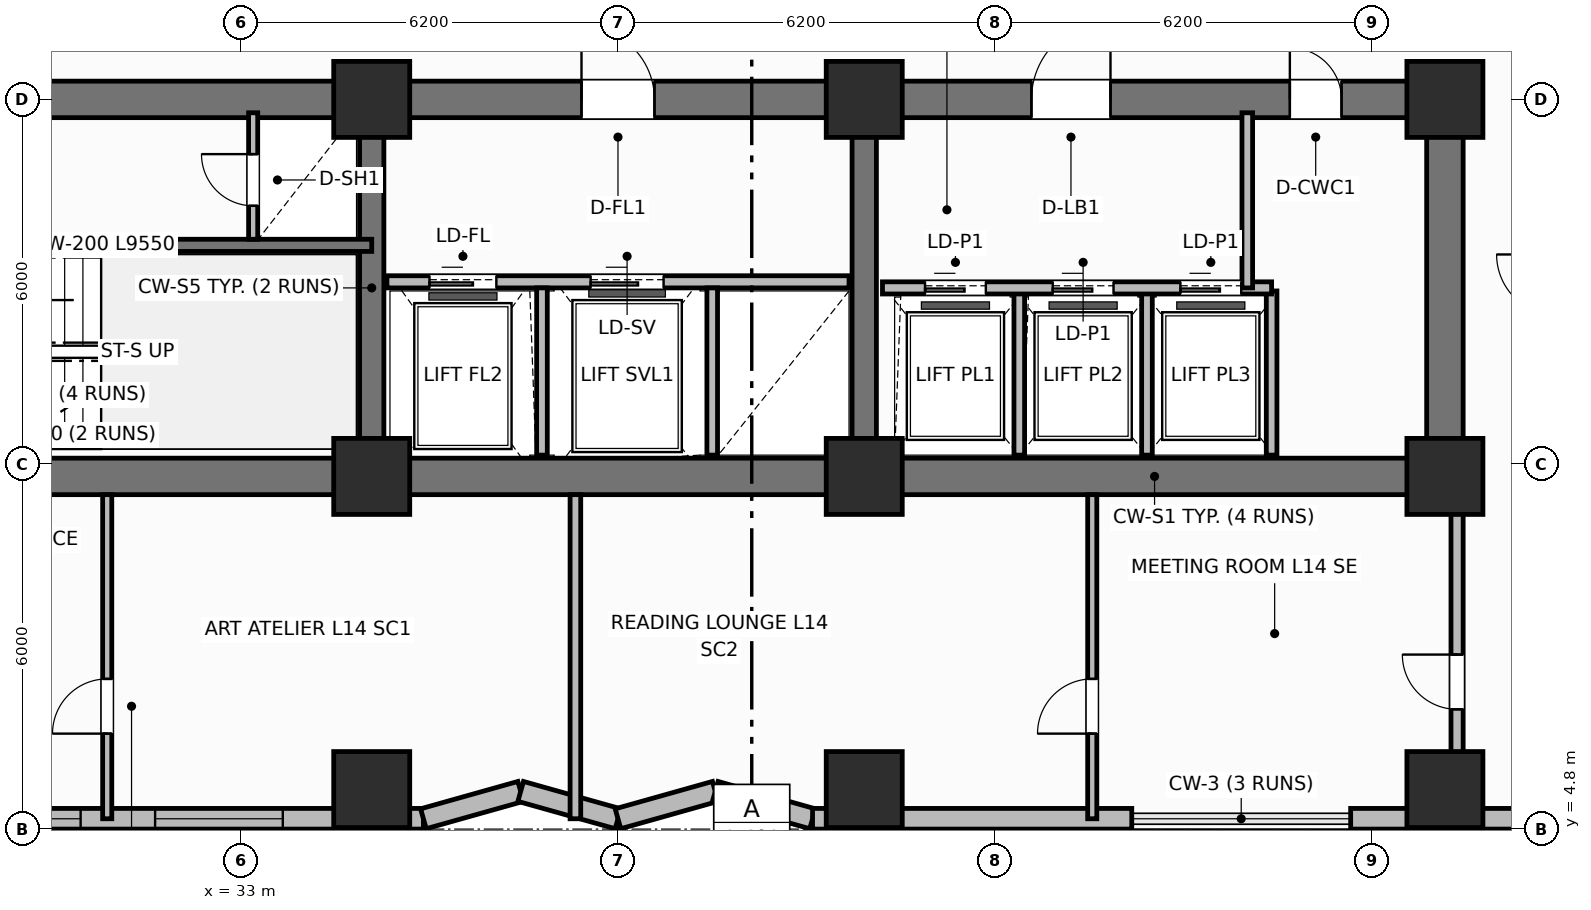
"""IFC4 building model, lengths in metres.
Left out: names, types, materials, properties, quantities, classifications, styles, units other than length and angle.
Written with IfcOpenShell. Run it as: python <this file> out.ifc"""

import sys

from ifc_helpers import new_model, si_unit, direction, frame, frame_2d, origin, origin_2d, place, context, subcontext, project, spatial, rectangle, extrude, element, fill, save


model = new_model("IFC4")
c1 = context("Model", 3, precision=1e-05, world=origin(), true_north=direction((0.0, 1.0)))
c2 = subcontext(c1, "Body", "Model", "MODEL_VIEW")
j1 = project(units=[si_unit("LENGTHUNIT", "METRE"), si_unit("PLANEANGLEUNIT", "RADIAN")], contexts=[c1])
p1 = place(None, origin())
s1 = spatial("IfcSite", under=j1, at=p1, CompositionType="ELEMENT")
p2 = place(p1, origin())
s2 = spatial("IfcBuilding", under=s1, at=p2, CompositionType="ELEMENT")
p3 = place(p2, frame((0.0, 0.0, 58.4)))
s3 = spatial("IfcBuildingStorey", under=s2, at=p3, CompositionType="ELEMENT", Elevation=58.4)
p4 = place(p3, frame((52.8, 10.6, 0.0), z_axis=(0.0, 0.0, 1.0), x_axis=(-1.0, 0.0, 0.0)))
e1 = element("IfcWall", 1, at=p4, inside=s3, PredefinedType="SHEAR", context=c2, shape_type="SweptSolid", body=[
    extrude(rectangle(XDim=27.2, YDim=0.6, at=frame_2d((13.6, 0.0))), origin(), (0.0, 0.0, 1.0), 3.7),
])
p5 = place(p3, frame((52.8, 10.9, 0.0), z_axis=(0.0, 0.0, 1.0), x_axis=(0.0, 1.0, 0.0)))
e2 = element("IfcWall", 2, at=p5, inside=s3, PredefinedType="SHEAR", context=c2, shape_type="SweptSolid", body=[
    extrude(rectangle(XDim=5.6, YDim=0.6, at=frame_2d((2.8, 0.0))), origin(), (0.0, 0.0, 1.0), 3.7),
])
p6 = place(p3, frame((25.6, 16.8, 0.0), z_axis=(0.0, 0.0, 1.0), x_axis=(1.0, 0.0, 0.0)))
e3 = element("IfcWall", 3, at=p6, inside=s3, PredefinedType="SHEAR", context=c2, shape_type="SweptSolid", body=[
    extrude(rectangle(XDim=27.2, YDim=0.6, at=frame_2d((13.6, 0.0))), origin(), (0.0, 0.0, 1.0), 3.7),
])
p7 = place(p6, frame((1.9, 0.0, 0.0)))
e4 = element("IfcOpeningElement", 4, at=p7, cuts=e3, PredefinedType="OPENING", context=c2, shape_type="SweptSolid", body=[
    extrude(rectangle(XDim=1.1, YDim=2.15, at=frame_2d((0.55, 1.075))), frame((0.0, 0.31, 0.0), z_axis=(0.0, -1.0, 0.0), x_axis=(1.0, 0.0, 0.0)), (0.0, 0.0, 1.0), 0.62),
])
p8 = place(p6, frame((13.0, 0.0, 0.0)))
e5 = element("IfcOpeningElement", 5, at=p8, cuts=e3, PredefinedType="OPENING", context=c2, shape_type="SweptSolid", body=[
    extrude(rectangle(XDim=1.2, YDim=2.15, at=frame_2d((0.6, 1.075))), frame((0.0, 0.31, 0.0), z_axis=(0.0, -1.0, 0.0), x_axis=(1.0, 0.0, 0.0)), (0.0, 0.0, 1.0), 0.62),
])
p9 = place(p6, frame((20.4, 0.0, 0.0)))
e6 = element("IfcOpeningElement", 6, at=p9, cuts=e3, PredefinedType="OPENING", context=c2, shape_type="SweptSolid", body=[
    extrude(rectangle(XDim=1.3, YDim=2.2, at=frame_2d((0.65, 1.1))), frame((0.0, 0.31, 0.0), z_axis=(0.0, -1.0, 0.0), x_axis=(1.0, 0.0, 0.0)), (0.0, 0.0, 1.0), 0.62),
])
p10 = place(p6, frame((24.65, 0.0, 0.0)))
e7 = element("IfcOpeningElement", 7, at=p10, cuts=e3, PredefinedType="OPENING", context=c2, shape_type="SweptSolid", body=[
    extrude(rectangle(XDim=0.85, YDim=2.1, at=frame_2d((0.425, 1.05))), frame((0.0, 0.31, 0.0), z_axis=(0.0, -1.0, 0.0), x_axis=(1.0, 0.0, 0.0)), (0.0, 0.0, 1.0), 0.62),
])
for number, where, z_axis, x_axis in (
    (8, (35.15, 10.9, 0.0), (0.0, 0.0, 1.0), (0.0, 1.0, 0.0)),
    (9, (43.25, 10.9, 0.0), (0.0, 0.0, 1.0), (0.0, 1.0, 0.0)),
):
    element("IfcWall", number, at=place(p3, frame(where, z_axis=z_axis, x_axis=x_axis)), inside=s3, PredefinedType="SHEAR", context=c2, shape_type="SweptSolid", body=[
        extrude(rectangle(XDim=5.6, YDim=0.4, at=frame_2d((2.8, 0.0))), origin(), (0.0, 0.0, 1.0), 3.7),
    ])
for number, where, z_axis, x_axis in (
    (10, (35.15, 10.6, 0.0), (0.0, 0.0, 1.0), (1.0, 0.0, 0.0)),
    (11, (35.15, 16.8, 0.0), (0.0, 0.0, 1.0), (1.0, 0.0, 0.0)),
    (12, (43.25, 10.6, 0.0), (0.0, 0.0, 1.0), (1.0, 0.0, 0.0)),
    (13, (43.25, 16.8, 0.0), (0.0, 0.0, 1.0), (1.0, 0.0, 0.0)),
    (14, (52.8, 10.6, 0.0), (0.0, 0.0, 1.0), (1.0, 0.0, 0.0)),
    (15, (52.8, 16.8, 0.0), (0.0, 0.0, 1.0), (1.0, 0.0, 0.0)),
    (16, (35.15, 5.45, 0.0), (0.0, 0.0, 1.0), (1.0, 0.0, 0.0)),
    (17, (43.25, 5.45, 0.0), (0.0, 0.0, 1.0), (1.0, 0.0, 0.0)),
    (18, (52.8, 5.45, 0.0), (0.0, 0.0, 1.0), (1.0, 0.0, 0.0)),
):
    element("IfcColumn", number, at=place(p3, frame(where, z_axis=z_axis, x_axis=x_axis)), inside=s3, PredefinedType="COLUMN", context=c2, shape_type="SweptSolid", body=[
        extrude(rectangle(XDim=1.25, YDim=1.25, at=origin_2d()), origin(), (0.0, 0.0, 1.0), 3.7),
    ])
p11 = place(p3, frame((18.6, 4.97, 0.0), z_axis=(0.0, 0.0, 1.0), x_axis=(1.0, 0.0, 0.0)))
e19 = element("IfcWall", 19, at=p11, inside=s3, PredefinedType="SOLIDWALL", context=c2, shape_type="SweptSolid", body=[
    extrude(rectangle(XDim=17.4, YDim=0.34, at=frame_2d((8.7, 0.0))), origin(), (0.0, 0.0, 1.0), 2.7),
])
p12 = place(p11, frame((1.262, 0.0, 0.68)))
e20 = element("IfcOpeningElement", 20, at=p12, cuts=e19, PredefinedType="OPENING", context=c2, shape_type="SweptSolid", body=[
    extrude(rectangle(XDim=2.1, YDim=1.9, at=frame_2d((1.05, 0.95))), frame((0.0, 0.18, 0.0), z_axis=(0.0, -1.0, 0.0), x_axis=(1.0, 0.0, 0.0)), (0.0, 0.0, 1.0), 0.36),
])
p13 = place(p11, frame((9.663, 0.0, 0.68)))
e21 = element("IfcOpeningElement", 21, at=p13, cuts=e19, PredefinedType="OPENING", context=c2, shape_type="SweptSolid", body=[
    extrude(rectangle(XDim=2.1, YDim=1.9, at=frame_2d((1.05, 0.95))), frame((0.0, 0.18, 0.0), z_axis=(0.0, -1.0, 0.0), x_axis=(1.0, 0.0, 0.0)), (0.0, 0.0, 1.0), 0.36),
])
p14 = place(p11, frame((12.988, 0.0, 0.68)))
e22 = element("IfcOpeningElement", 22, at=p14, cuts=e19, PredefinedType="OPENING", context=c2, shape_type="SweptSolid", body=[
    extrude(rectangle(XDim=2.1, YDim=1.9, at=frame_2d((1.05, 0.95))), frame((0.0, 0.18, 0.0), z_axis=(0.0, -1.0, 0.0), x_axis=(1.0, 0.0, 0.0)), (0.0, 0.0, 1.0), 0.36),
])
p15 = place(p3, frame((36.0, 4.97, 0.0), z_axis=(0.0, 0.0, 1.0), x_axis=(0.962662902433, 0.270703040766, 0.0)))
e23 = element("IfcWall", 23, at=p15, inside=s3, PredefinedType="SOLIDWALL", context=c2, shape_type="SweptSolid", body=[
    extrude(rectangle(XDim=1.662, YDim=0.34, at=frame_2d((0.831, 0.0))), origin(), (0.0, 0.0, 1.0), 2.7),
])
p16 = place(p3, frame((37.6, 5.42, 0.0), z_axis=(0.0, 0.0, 1.0), x_axis=(0.962652136636, -0.270741322725, 0.0)))
e24 = element("IfcWall", 24, at=p16, inside=s3, PredefinedType="SOLIDWALL", context=c2, shape_type="SweptSolid", body=[
    extrude(rectangle(XDim=1.662, YDim=0.34, at=frame_2d((0.831, 0.0))), origin(), (0.0, 0.0, 1.0), 2.7),
])
p17 = place(p3, frame((39.2, 4.97, 0.0), z_axis=(0.0, 0.0, 1.0), x_axis=(0.962662902433, 0.270703040766, 0.0)))
e25 = element("IfcWall", 25, at=p17, inside=s3, PredefinedType="SOLIDWALL", context=c2, shape_type="SweptSolid", body=[
    extrude(rectangle(XDim=1.662, YDim=0.34, at=frame_2d((0.831, 0.0))), origin(), (0.0, 0.0, 1.0), 2.7),
])
p18 = place(p3, frame((40.8, 5.42, 0.0), z_axis=(0.0, 0.0, 1.0), x_axis=(0.962652136636, -0.270741322725, 0.0)))
e26 = element("IfcWall", 26, at=p18, inside=s3, PredefinedType="SOLIDWALL", context=c2, shape_type="SweptSolid", body=[
    extrude(rectangle(XDim=1.662, YDim=0.34, at=frame_2d((0.831, 0.0))), origin(), (0.0, 0.0, 1.0), 2.7),
])
p19 = place(p3, frame((42.4, 4.97, 0.0), z_axis=(0.0, 0.0, 1.0), x_axis=(1.0, 0.0, 0.0)))
e27 = element("IfcWall", 27, at=p19, inside=s3, PredefinedType="SOLIDWALL", context=c2, shape_type="SweptSolid", body=[
    extrude(rectangle(XDim=5.25, YDim=0.34, at=frame_2d((2.625, 0.0))), origin(), (0.0, 0.0, 1.0), 2.7),
])
p20 = place(p3, frame((51.25, 4.97, 0.0), z_axis=(0.0, 0.0, 1.0), x_axis=(1.0, 0.0, 0.0)))
e28 = element("IfcWall", 28, at=p20, inside=s3, PredefinedType="SOLIDWALL", context=c2, shape_type="SweptSolid", body=[
    extrude(rectangle(XDim=8.55, YDim=0.34, at=frame_2d((4.275, 0.0))), origin(), (0.0, 0.0, 1.0), 2.7),
])
p21 = place(p20, frame((3.925, 0.0, 0.68)))
e29 = element("IfcOpeningElement", 29, at=p21, cuts=e28, PredefinedType="OPENING", context=c2, shape_type="SweptSolid", body=[
    extrude(rectangle(XDim=2.1, YDim=1.9, at=frame_2d((1.05, 0.95))), frame((0.0, 0.18, 0.0), z_axis=(0.0, -1.0, 0.0), x_axis=(1.0, 0.0, 0.0)), (0.0, 0.0, 1.0), 0.36),
])
p22 = place(p3, frame((25.6, 14.4, 0.0), z_axis=(0.0, 0.0, 1.0), x_axis=(1.0, 0.0, 0.0)))
e30 = element("IfcWall", 30, at=p22, inside=s3, PredefinedType="SHEAR", context=c2, shape_type="SweptSolid", body=[
    extrude(rectangle(XDim=9.55, YDim=0.2, at=frame_2d((4.775, 0.0))), origin(), (0.0, 0.0, 1.0), 3.7),
])
p23 = place(p22, frame((1.05, 0.0, 0.0)))
e31 = element("IfcOpeningElement", 31, at=p23, cuts=e30, PredefinedType="OPENING", context=c2, shape_type="SweptSolid", body=[
    extrude(rectangle(XDim=1.1, YDim=2.15, at=frame_2d((0.55, 1.075))), frame((0.0, 0.11, 0.0), z_axis=(0.0, -1.0, 0.0), x_axis=(1.0, 0.0, 0.0)), (0.0, 0.0, 1.0), 0.22),
])
p24 = place(p3, frame((33.2, 14.5, 0.0), z_axis=(0.0, 0.0, 1.0), x_axis=(0.0, 1.0, 0.0)))
e32 = element("IfcWall", 32, at=p24, inside=s3, PredefinedType="PARTITIONING", context=c2, shape_type="SweptSolid", body=[
    extrude(rectangle(XDim=2.08, YDim=0.15, at=frame_2d((1.04, 0.0))), origin(), (0.0, 0.0, 1.0), 2.53),
])
p25 = place(p24, frame((0.55, 0.0, 0.0)))
e33 = element("IfcOpeningElement", 33, at=p25, cuts=e32, PredefinedType="OPENING", context=c2, shape_type="SweptSolid", body=[
    extrude(rectangle(XDim=0.85, YDim=2.05, at=frame_2d((0.425, 1.025))), frame((0.0, 0.085, 0.0), z_axis=(0.0, -1.0, 0.0), x_axis=(1.0, 0.0, 0.0)), (0.0, 0.0, 1.0), 0.17),
])
p26 = place(p3, frame((35.4, 13.8, 0.0), z_axis=(0.0, 0.0, 1.0), x_axis=(1.0, 0.0, 0.0)))
e34 = element("IfcWall", 34, at=p26, inside=s3, PredefinedType="PARTITIONING", context=c2, shape_type="SweptSolid", body=[
    extrude(rectangle(XDim=7.6, YDim=0.2, at=frame_2d((3.8, 0.0))), origin(), (0.0, 0.0, 1.0), 2.3),
])
p27 = place(p26, frame((0.7, 0.0, 0.0)))
e35 = element("IfcOpeningElement", 35, at=p27, cuts=e34, PredefinedType="OPENING", context=c2, shape_type="SweptSolid", body=[
    extrude(rectangle(XDim=1.1, YDim=2.15, at=frame_2d((0.55, 1.075))), frame((0.0, 0.11, 0.0), z_axis=(0.0, -1.0, 0.0), x_axis=(1.0, 0.0, 0.0)), (0.0, 0.0, 1.0), 0.22),
])
p28 = place(p26, frame((3.35, 0.0, 0.0)))
e36 = element("IfcOpeningElement", 36, at=p28, cuts=e34, PredefinedType="OPENING", context=c2, shape_type="SweptSolid", body=[
    extrude(rectangle(XDim=1.2, YDim=2.15, at=frame_2d((0.6, 1.075))), frame((0.0, 0.11, 0.0), z_axis=(0.0, -1.0, 0.0), x_axis=(1.0, 0.0, 0.0)), (0.0, 0.0, 1.0), 0.22),
])
for number, where, z_axis, x_axis in (
    (37, (37.95, 10.95, 0.0), (0.0, 0.0, 1.0), (0.0, 1.0, 0.0)),
    (38, (40.75, 10.95, 0.0), (0.0, 0.0, 1.0), (0.0, 1.0, 0.0)),
):
    element("IfcWall", number, at=place(p3, frame(where, z_axis=z_axis, x_axis=x_axis)), inside=s3, PredefinedType="PARTITIONING", context=c2, shape_type="SweptSolid", body=[
        extrude(rectangle(XDim=2.75, YDim=0.175, at=frame_2d((1.375, 0.0))), origin(), (0.0, 0.0, 1.0), 2.53),
    ])
for number, where, z_axis, x_axis in (
    (39, (45.8, 10.95, 0.0), (0.0, 0.0, 1.0), (0.0, 1.0, 0.0)),
    (40, (47.9, 10.95, 0.0), (0.0, 0.0, 1.0), (0.0, 1.0, 0.0)),
    (41, (49.95, 10.95, 0.0), (0.0, 0.0, 1.0), (0.0, 1.0, 0.0)),
):
    element("IfcWall", number, at=place(p3, frame(where, z_axis=z_axis, x_axis=x_axis)), inside=s3, PredefinedType="PARTITIONING", context=c2, shape_type="SweptSolid", body=[
        extrude(rectangle(XDim=2.7, YDim=0.175, at=frame_2d((1.35, 0.0))), origin(), (0.0, 0.0, 1.0), 2.53),
    ])
p29 = place(p3, frame((43.55, 13.7, 0.0), z_axis=(0.0, 0.0, 1.0), x_axis=(1.0, 0.0, 0.0)))
e42 = element("IfcWall", 42, at=p29, inside=s3, PredefinedType="PARTITIONING", context=c2, shape_type="SweptSolid", body=[
    extrude(rectangle(XDim=6.4, YDim=0.2, at=frame_2d((3.2, 0.0))), origin(), (0.0, 0.0, 1.0), 2.53),
])
p30 = place(p29, frame((0.7, 0.0, 0.0)))
e43 = element("IfcOpeningElement", 43, at=p30, cuts=e42, PredefinedType="OPENING", context=c2, shape_type="SweptSolid", body=[
    extrude(rectangle(XDim=1.0, YDim=2.15, at=frame_2d((0.5, 1.075))), frame((0.0, 0.11, 0.0), z_axis=(0.0, -1.0, 0.0), x_axis=(1.0, 0.0, 0.0)), (0.0, 0.0, 1.0), 0.22),
])
p31 = place(p29, frame((2.8, 0.0, 0.0)))
e44 = element("IfcOpeningElement", 44, at=p31, cuts=e42, PredefinedType="OPENING", context=c2, shape_type="SweptSolid", body=[
    extrude(rectangle(XDim=1.0, YDim=2.15, at=frame_2d((0.5, 1.075))), frame((0.0, 0.11, 0.0), z_axis=(0.0, -1.0, 0.0), x_axis=(1.0, 0.0, 0.0)), (0.0, 0.0, 1.0), 0.22),
])
p32 = place(p29, frame((4.9, 0.0, 0.0)))
e45 = element("IfcOpeningElement", 45, at=p32, cuts=e42, PredefinedType="OPENING", context=c2, shape_type="SweptSolid", body=[
    extrude(rectangle(XDim=1.0, YDim=2.15, at=frame_2d((0.5, 1.075))), frame((0.0, 0.11, 0.0), z_axis=(0.0, -1.0, 0.0), x_axis=(1.0, 0.0, 0.0)), (0.0, 0.0, 1.0), 0.22),
])
p33 = place(p3, frame((49.55, 13.7, 0.0), z_axis=(0.0, 0.0, 1.0), x_axis=(0.0, 1.0, 0.0)))
e46 = element("IfcWall", 46, at=p33, inside=s3, PredefinedType="PARTITIONING", context=c2, shape_type="SweptSolid", body=[
    extrude(rectangle(XDim=2.88, YDim=0.175, at=frame_2d((1.44, 0.0))), origin(), (0.0, 0.0, 1.0), 2.53),
])
p34 = place(p3, frame((30.8, 4.97, 0.0), z_axis=(0.0, 0.0, 1.0), x_axis=(0.0, 1.0, 0.0)))
e47 = element("IfcWall", 47, at=p34, inside=s3, PredefinedType="PARTITIONING", context=c2, shape_type="SweptSolid", body=[
    extrude(rectangle(XDim=5.33, YDim=0.15, at=frame_2d((2.665, 0.0))), origin(), (0.0, 0.0, 1.0), 2.53),
])
p35 = place(p34, frame((1.4, 0.0, 0.0)))
e48 = element("IfcOpeningElement", 48, at=p35, cuts=e47, PredefinedType="OPENING", context=c2, shape_type="SweptSolid", body=[
    extrude(rectangle(XDim=0.9, YDim=2.1, at=frame_2d((0.45, 1.05))), frame((0.0, 0.085, 0.0), z_axis=(0.0, -1.0, 0.0), x_axis=(1.0, 0.0, 0.0)), (0.0, 0.0, 1.0), 0.17),
])
p36 = place(p3, frame((38.5, 4.97, 0.0), z_axis=(0.0, 0.0, 1.0), x_axis=(0.0, 1.0, 0.0)))
e49 = element("IfcWall", 49, at=p36, inside=s3, PredefinedType="PARTITIONING", context=c2, shape_type="SweptSolid", body=[
    extrude(rectangle(XDim=5.33, YDim=0.175, at=frame_2d((2.665, 0.0))), origin(), (0.0, 0.0, 1.0), 2.53),
])
p37 = place(p3, frame((47.0, 4.97, 0.0), z_axis=(0.0, 0.0, 1.0), x_axis=(0.0, 1.0, 0.0)))
e50 = element("IfcWall", 50, at=p37, inside=s3, PredefinedType="PARTITIONING", context=c2, shape_type="SweptSolid", body=[
    extrude(rectangle(XDim=5.33, YDim=0.15, at=frame_2d((2.665, 0.0))), origin(), (0.0, 0.0, 1.0), 2.53),
])
p38 = place(p37, frame((1.4, 0.0, 0.0)))
e51 = element("IfcOpeningElement", 51, at=p38, cuts=e50, PredefinedType="OPENING", context=c2, shape_type="SweptSolid", body=[
    extrude(rectangle(XDim=0.9, YDim=2.1, at=frame_2d((0.45, 1.05))), frame((0.0, 0.085, 0.0), z_axis=(0.0, -1.0, 0.0), x_axis=(1.0, 0.0, 0.0)), (0.0, 0.0, 1.0), 0.17),
])
p39 = place(p3, frame((53.0, 5.72, 0.0), z_axis=(0.0, 0.0, 1.0), x_axis=(0.0, 1.0, 0.0)))
e52 = element("IfcWall", 52, at=p39, inside=s3, PredefinedType="PARTITIONING", context=c2, shape_type="SweptSolid", body=[
    extrude(rectangle(XDim=4.58, YDim=0.2, at=frame_2d((2.29, 0.0))), origin(), (0.0, 0.0, 1.0), 2.53),
])
p40 = place(p39, frame((1.05, 0.0, 0.0)))
e53 = element("IfcOpeningElement", 53, at=p40, cuts=e52, PredefinedType="OPENING", context=c2, shape_type="SweptSolid", body=[
    extrude(rectangle(XDim=0.9, YDim=2.1, at=frame_2d((0.45, 1.05))), frame((0.0, 0.11, 0.0), z_axis=(0.0, -1.0, 0.0), x_axis=(1.0, 0.0, 0.0)), (0.0, 0.0, 1.0), 0.22),
])
p41 = place(p13, origin())
e54 = element("IfcWindow", 54, at=p41, inside=s3, PartitioningType="SINGLE_PANEL", PredefinedType="WINDOW", context=c2, shape_type="SweptSolid", body=[
    extrude(rectangle(XDim=2.1, YDim=1.9, at=frame_2d((1.05, 0.95))), frame((0.0, 0.03, 0.0), z_axis=(0.0, -1.0, 0.0), x_axis=(1.0, 0.0, 0.0)), (0.0, 0.0, 1.0), 0.06),
])
fill(e21, e54)
p42 = place(p14, origin())
e55 = element("IfcWindow", 55, at=p42, inside=s3, PartitioningType="SINGLE_PANEL", PredefinedType="WINDOW", context=c2, shape_type="SweptSolid", body=[
    extrude(rectangle(XDim=2.1, YDim=1.9, at=frame_2d((1.05, 0.95))), frame((0.0, 0.03, 0.0), z_axis=(0.0, -1.0, 0.0), x_axis=(1.0, 0.0, 0.0)), (0.0, 0.0, 1.0), 0.06),
])
fill(e22, e55)
p43 = place(p25, origin())
e56 = element("IfcDoor", 56, at=p43, inside=s3, OperationType="SINGLE_SWING_RIGHT", PredefinedType="TRAPDOOR", context=c2, shape_type="SweptSolid", body=[
    extrude(rectangle(XDim=0.85, YDim=2.05, at=frame_2d((0.425, 1.025))), frame((0.0, 0.025, 0.0), z_axis=(0.0, -1.0, 0.0), x_axis=(1.0, 0.0, 0.0)), (0.0, 0.0, 1.0), 0.05),
])
fill(e33, e56)
p44 = place(p27, origin())
e57 = element("IfcDoor", 57, at=p44, inside=s3, OperationType="SLIDING_TO_LEFT", PredefinedType="DOOR", context=c2, shape_type="SweptSolid", body=[
    extrude(rectangle(XDim=1.1, YDim=2.15, at=frame_2d((0.55, 1.075))), frame((0.0, 0.025, 0.0), z_axis=(0.0, -1.0, 0.0), x_axis=(1.0, 0.0, 0.0)), (0.0, 0.0, 1.0), 0.05),
])
fill(e35, e57)
p45 = place(p28, origin())
e58 = element("IfcDoor", 58, at=p45, inside=s3, OperationType="SLIDING_TO_LEFT", PredefinedType="DOOR", context=c2, shape_type="SweptSolid", body=[
    extrude(rectangle(XDim=1.2, YDim=2.15, at=frame_2d((0.6, 1.075))), frame((0.0, 0.025, 0.0), z_axis=(0.0, -1.0, 0.0), x_axis=(1.0, 0.0, 0.0)), (0.0, 0.0, 1.0), 0.05),
])
fill(e36, e58)
p46 = place(p30, origin())
e59 = element("IfcDoor", 59, at=p46, inside=s3, OperationType="SLIDING_TO_LEFT", PredefinedType="DOOR", context=c2, shape_type="SweptSolid", body=[
    extrude(rectangle(XDim=1.0, YDim=2.15, at=frame_2d((0.5, 1.075))), frame((0.0, 0.025, 0.0), z_axis=(0.0, -1.0, 0.0), x_axis=(1.0, 0.0, 0.0)), (0.0, 0.0, 1.0), 0.05),
])
fill(e43, e59)
p47 = place(p31, origin())
e60 = element("IfcDoor", 60, at=p47, inside=s3, OperationType="SLIDING_TO_LEFT", PredefinedType="DOOR", context=c2, shape_type="SweptSolid", body=[
    extrude(rectangle(XDim=1.0, YDim=2.15, at=frame_2d((0.5, 1.075))), frame((0.0, 0.025, 0.0), z_axis=(0.0, -1.0, 0.0), x_axis=(1.0, 0.0, 0.0)), (0.0, 0.0, 1.0), 0.05),
])
fill(e44, e60)
p48 = place(p32, origin())
e61 = element("IfcDoor", 61, at=p48, inside=s3, OperationType="SLIDING_TO_LEFT", PredefinedType="DOOR", context=c2, shape_type="SweptSolid", body=[
    extrude(rectangle(XDim=1.0, YDim=2.15, at=frame_2d((0.5, 1.075))), frame((0.0, 0.025, 0.0), z_axis=(0.0, -1.0, 0.0), x_axis=(1.0, 0.0, 0.0)), (0.0, 0.0, 1.0), 0.05),
])
fill(e45, e61)
p49 = place(p35, origin())
e62 = element("IfcDoor", 62, at=p49, inside=s3, OperationType="SINGLE_SWING_LEFT", PredefinedType="DOOR", context=c2, shape_type="SweptSolid", body=[
    extrude(rectangle(XDim=0.9, YDim=2.1, at=frame_2d((0.45, 1.05))), frame((0.0, 0.025, 0.0), z_axis=(0.0, -1.0, 0.0), x_axis=(1.0, 0.0, 0.0)), (0.0, 0.0, 1.0), 0.05),
])
fill(e48, e62)
p50 = place(p38, origin())
e63 = element("IfcDoor", 63, at=p50, inside=s3, OperationType="SINGLE_SWING_LEFT", PredefinedType="DOOR", context=c2, shape_type="SweptSolid", body=[
    extrude(rectangle(XDim=0.9, YDim=2.1, at=frame_2d((0.45, 1.05))), frame((0.0, 0.025, 0.0), z_axis=(0.0, -1.0, 0.0), x_axis=(1.0, 0.0, 0.0)), (0.0, 0.0, 1.0), 0.05),
])
fill(e51, e63)
p51 = place(p40, origin())
e64 = element("IfcDoor", 64, at=p51, inside=s3, OperationType="SINGLE_SWING_RIGHT", PredefinedType="DOOR", context=c2, shape_type="SweptSolid", body=[
    extrude(rectangle(XDim=0.9, YDim=2.1, at=frame_2d((0.45, 1.05))), frame((0.0, 0.025, 0.0), z_axis=(0.0, -1.0, 0.0), x_axis=(1.0, 0.0, 0.0)), (0.0, 0.0, 1.0), 0.05),
])
fill(e53, e64)
p52 = place(p8, origin())
e65 = element("IfcDoor", 65, at=p52, inside=s3, OperationType="SINGLE_SWING_LEFT", PredefinedType="DOOR", context=c2, shape_type="SweptSolid", body=[
    extrude(rectangle(XDim=1.2, YDim=2.15, at=frame_2d((0.6, 1.075))), frame((0.0, 0.025, 0.0), z_axis=(0.0, -1.0, 0.0), x_axis=(1.0, 0.0, 0.0)), (0.0, 0.0, 1.0), 0.05),
])
fill(e5, e65)
p53 = place(p9, origin())
e66 = element("IfcDoor", 66, at=p53, inside=s3, OperationType="SINGLE_SWING_RIGHT", PredefinedType="DOOR", context=c2, shape_type="SweptSolid", body=[
    extrude(rectangle(XDim=1.3, YDim=2.2, at=frame_2d((0.65, 1.1))), frame((0.0, 0.025, 0.0), z_axis=(0.0, -1.0, 0.0), x_axis=(1.0, 0.0, 0.0)), (0.0, 0.0, 1.0), 0.05),
])
fill(e6, e66)
p54 = place(p10, origin())
e67 = element("IfcDoor", 67, at=p54, inside=s3, OperationType="SINGLE_SWING_LEFT", PredefinedType="DOOR", context=c2, shape_type="SweptSolid", body=[
    extrude(rectangle(XDim=0.85, YDim=2.1, at=frame_2d((0.425, 1.05))), frame((0.0, 0.025, 0.0), z_axis=(0.0, -1.0, 0.0), x_axis=(1.0, 0.0, 0.0)), (0.0, 0.0, 1.0), 0.05),
])
fill(e7, e67)
save(model, sys.argv[1])
